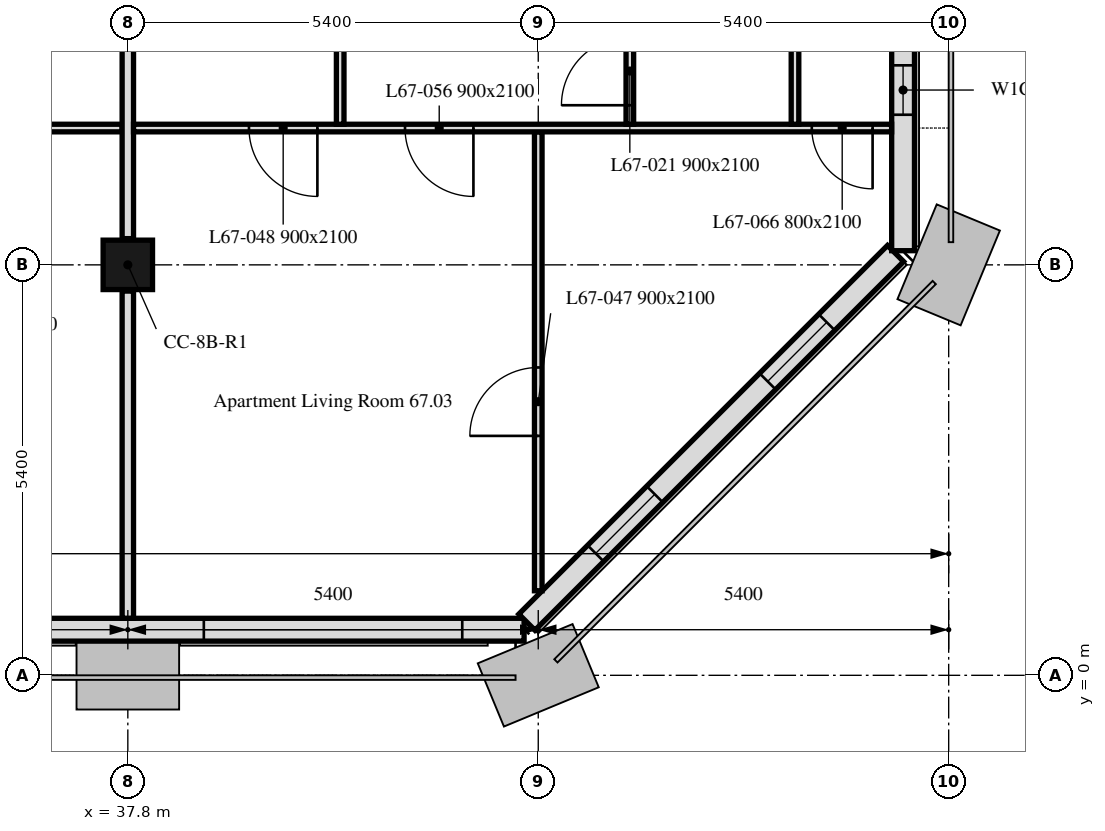
"""IFC4 building model, lengths in metres.
Left out: names, types, materials, properties, quantities, classifications, styles, units other than length and angle.
Written with IfcOpenShell. Run it as: python <this file> out.ifc"""

import sys

from ifc_helpers import new_model, si_unit, direction, frame, frame_2d, origin, origin_2d, place, context, subcontext, project, spatial, rectangle, extrude, element, fill, save


model = new_model("IFC4")
c1 = context("Model", 3, precision=1e-05, world=origin(), true_north=direction((0.0, 1.0)))
c2 = subcontext(c1, "Body", "Model", "MODEL_VIEW")
j1 = project(units=[si_unit("LENGTHUNIT", "METRE"), si_unit("PLANEANGLEUNIT", "RADIAN")], contexts=[c1])
p1 = place(None, origin())
s1 = spatial("IfcSite", under=j1, at=p1, CompositionType="ELEMENT")
p2 = place(p1, origin())
s2 = spatial("IfcBuilding", under=s1, at=p2, CompositionType="ELEMENT")
p3 = place(p2, frame((0.0, 0.0, 275.2)))
s3 = spatial("IfcBuildingStorey", under=s2, at=p3, CompositionType="ELEMENT", Elevation=275.2)
p4 = place(p3, frame((37.8, 5.4, 0.0), z_axis=(0.0, 0.0, 1.0), x_axis=(1.0, 0.0, 0.0)))
e1 = element("IfcColumn", 1, at=p4, inside=s3, PredefinedType="COLUMN", context=c2, shape_type="SweptSolid", body=[
    extrude(rectangle(XDim=0.65, YDim=0.65, at=origin_2d()), origin(), (0.0, 0.0, 1.0), 3.0),
])
p5 = place(p3, frame((10.986, 0.6, 0.0), z_axis=(0.0, 0.0, 1.0), x_axis=(1.0, 0.0, 0.0)))
e2 = element("IfcWall", 2, at=p5, inside=s3, PredefinedType="SOLIDWALL", context=c2, shape_type="SweptSolid", body=[
    extrude(rectangle(XDim=32.027, YDim=0.3, at=frame_2d((16.014, 0.0))), origin(), (0.0, 0.0, 1.0), 3.0),
])
p6 = place(p5, frame((2.764, 0.0, 0.9)))
e3 = element("IfcOpeningElement", 3, at=p6, cuts=e2, PredefinedType="OPENING", context=c2, shape_type="SweptSolid", body=[
    extrude(rectangle(XDim=1.1, YDim=1.7, at=frame_2d((0.55, 0.85))), frame((0.0, 0.16, 0.0), z_axis=(0.0, -1.0, 0.0), x_axis=(1.0, 0.0, 0.0)), (0.0, 0.0, 1.0), 0.32),
])
p7 = place(p5, frame((6.214, 0.0, 0.9)))
e4 = element("IfcOpeningElement", 4, at=p7, cuts=e2, PredefinedType="OPENING", context=c2, shape_type="SweptSolid", body=[
    extrude(rectangle(XDim=3.4, YDim=1.7, at=frame_2d((1.7, 0.85))), frame((0.0, 0.16, 0.0), z_axis=(0.0, -1.0, 0.0), x_axis=(1.0, 0.0, 0.0)), (0.0, 0.0, 1.0), 0.32),
])
p8 = place(p5, frame((13.564, 0.0, 0.9)))
e5 = element("IfcOpeningElement", 5, at=p8, cuts=e2, PredefinedType="OPENING", context=c2, shape_type="SweptSolid", body=[
    extrude(rectangle(XDim=1.1, YDim=1.7, at=frame_2d((0.55, 0.85))), frame((0.0, 0.16, 0.0), z_axis=(0.0, -1.0, 0.0), x_axis=(1.0, 0.0, 0.0)), (0.0, 0.0, 1.0), 0.32),
])
p9 = place(p5, frame((17.014, 0.0, 0.9)))
e6 = element("IfcOpeningElement", 6, at=p9, cuts=e2, PredefinedType="OPENING", context=c2, shape_type="SweptSolid", body=[
    extrude(rectangle(XDim=3.4, YDim=1.7, at=frame_2d((1.7, 0.85))), frame((0.0, 0.16, 0.0), z_axis=(0.0, -1.0, 0.0), x_axis=(1.0, 0.0, 0.0)), (0.0, 0.0, 1.0), 0.32),
])
p10 = place(p5, frame((24.364, 0.0, 0.9)))
e7 = element("IfcOpeningElement", 7, at=p10, cuts=e2, PredefinedType="OPENING", context=c2, shape_type="SweptSolid", body=[
    extrude(rectangle(XDim=1.1, YDim=1.7, at=frame_2d((0.55, 0.85))), frame((0.0, 0.16, 0.0), z_axis=(0.0, -1.0, 0.0), x_axis=(1.0, 0.0, 0.0)), (0.0, 0.0, 1.0), 0.32),
])
p11 = place(p5, frame((27.814, 0.0, 0.9)))
e8 = element("IfcOpeningElement", 8, at=p11, cuts=e2, PredefinedType="OPENING", context=c2, shape_type="SweptSolid", body=[
    extrude(rectangle(XDim=3.4, YDim=1.7, at=frame_2d((1.7, 0.85))), frame((0.0, 0.16, 0.0), z_axis=(0.0, -1.0, 0.0), x_axis=(1.0, 0.0, 0.0)), (0.0, 0.0, 1.0), 0.32),
])
p12 = place(p3, frame((43.051, 0.699, 0.0), z_axis=(0.0, 0.0, 1.0), x_axis=(0.707106781187, 0.707106781187, 0.0)))
e9 = element("IfcWall", 9, at=p12, inside=s3, PredefinedType="SOLIDWALL", context=c2, shape_type="SweptSolid", body=[
    extrude(rectangle(XDim=6.86, YDim=0.3, at=frame_2d((3.43, 0.0))), origin(), (0.0, 0.0, 1.0), 3.0),
])
p13 = place(p12, frame((1.28, 0.0, 0.9)))
e10 = element("IfcOpeningElement", 10, at=p13, cuts=e9, PredefinedType="OPENING", context=c2, shape_type="SweptSolid", body=[
    extrude(rectangle(XDim=1.1, YDim=1.7, at=frame_2d((0.55, 0.85))), frame((0.0, 0.16, 0.0), z_axis=(0.0, -1.0, 0.0), x_axis=(1.0, 0.0, 0.0)), (0.0, 0.0, 1.0), 0.32),
])
p14 = place(p12, frame((4.48, 0.0, 0.9)))
e11 = element("IfcOpeningElement", 11, at=p14, cuts=e9, PredefinedType="OPENING", context=c2, shape_type="SweptSolid", body=[
    extrude(rectangle(XDim=1.1, YDim=1.7, at=frame_2d((0.55, 0.85))), frame((0.0, 0.16, 0.0), z_axis=(0.0, -1.0, 0.0), x_axis=(1.0, 0.0, 0.0)), (0.0, 0.0, 1.0), 0.32),
])
p15 = place(p3, frame((48.0, 5.586, 0.0), z_axis=(0.0, 0.0, 1.0), x_axis=(0.0, 1.0, 0.0)))
e12 = element("IfcWall", 12, at=p15, inside=s3, PredefinedType="SOLIDWALL", context=c2, shape_type="SweptSolid", body=[
    extrude(rectangle(XDim=32.027, YDim=0.3, at=frame_2d((16.014, 0.0))), origin(), (0.0, 0.0, 1.0), 3.0),
])
p16 = place(p15, frame((1.789, 0.0, 0.9)))
e13 = element("IfcOpeningElement", 13, at=p16, cuts=e12, PredefinedType="OPENING", context=c2, shape_type="SweptSolid", body=[
    extrude(rectangle(XDim=0.65, YDim=1.7, at=frame_2d((0.325, 0.85))), frame((0.0, 0.16, 0.0), z_axis=(0.0, -1.0, 0.0), x_axis=(1.0, 0.0, 0.0)), (0.0, 0.0, 1.0), 0.32),
])
p17 = place(p15, frame((2.764, 0.0, 0.9)))
e14 = element("IfcOpeningElement", 14, at=p17, cuts=e12, PredefinedType="OPENING", context=c2, shape_type="SweptSolid", body=[
    extrude(rectangle(XDim=1.1, YDim=1.7, at=frame_2d((0.55, 0.85))), frame((0.0, 0.16, 0.0), z_axis=(0.0, -1.0, 0.0), x_axis=(1.0, 0.0, 0.0)), (0.0, 0.0, 1.0), 0.32),
])
p18 = place(p15, frame((6.564, 0.0, 0.9)))
e15 = element("IfcOpeningElement", 15, at=p18, cuts=e12, PredefinedType="OPENING", context=c2, shape_type="SweptSolid", body=[
    extrude(rectangle(XDim=1.1, YDim=1.7, at=frame_2d((0.55, 0.85))), frame((0.0, 0.16, 0.0), z_axis=(0.0, -1.0, 0.0), x_axis=(1.0, 0.0, 0.0)), (0.0, 0.0, 1.0), 0.32),
])
p19 = place(p15, frame((7.989, 0.0, 0.9)))
e16 = element("IfcOpeningElement", 16, at=p19, cuts=e12, PredefinedType="OPENING", context=c2, shape_type="SweptSolid", body=[
    extrude(rectangle(XDim=0.65, YDim=1.7, at=frame_2d((0.325, 0.85))), frame((0.0, 0.16, 0.0), z_axis=(0.0, -1.0, 0.0), x_axis=(1.0, 0.0, 0.0)), (0.0, 0.0, 1.0), 0.32),
])
p20 = place(p15, frame((11.964, 0.0, 0.9)))
e17 = element("IfcOpeningElement", 17, at=p20, cuts=e12, PredefinedType="OPENING", context=c2, shape_type="SweptSolid", body=[
    extrude(rectangle(XDim=1.1, YDim=1.7, at=frame_2d((0.55, 0.85))), frame((0.0, 0.16, 0.0), z_axis=(0.0, -1.0, 0.0), x_axis=(1.0, 0.0, 0.0)), (0.0, 0.0, 1.0), 0.32),
])
p21 = place(p15, frame((13.564, 0.0, 0.9)))
e18 = element("IfcOpeningElement", 18, at=p21, cuts=e12, PredefinedType="OPENING", context=c2, shape_type="SweptSolid", body=[
    extrude(rectangle(XDim=1.1, YDim=1.7, at=frame_2d((0.55, 0.85))), frame((0.0, 0.16, 0.0), z_axis=(0.0, -1.0, 0.0), x_axis=(1.0, 0.0, 0.0)), (0.0, 0.0, 1.0), 0.32),
])
p22 = place(p15, frame((17.014, 0.0, 0.9)))
e19 = element("IfcOpeningElement", 19, at=p22, cuts=e12, PredefinedType="OPENING", context=c2, shape_type="SweptSolid", body=[
    extrude(rectangle(XDim=3.4, YDim=1.7, at=frame_2d((1.7, 0.85))), frame((0.0, 0.16, 0.0), z_axis=(0.0, -1.0, 0.0), x_axis=(1.0, 0.0, 0.0)), (0.0, 0.0, 1.0), 0.32),
])
p23 = place(p15, frame((22.764, 0.0, 0.9)))
e20 = element("IfcOpeningElement", 20, at=p23, cuts=e12, PredefinedType="OPENING", context=c2, shape_type="SweptSolid", body=[
    extrude(rectangle(XDim=1.1, YDim=1.7, at=frame_2d((0.55, 0.85))), frame((0.0, 0.16, 0.0), z_axis=(0.0, -1.0, 0.0), x_axis=(1.0, 0.0, 0.0)), (0.0, 0.0, 1.0), 0.32),
])
p24 = place(p15, frame((24.364, 0.0, 0.9)))
e21 = element("IfcOpeningElement", 21, at=p24, cuts=e12, PredefinedType="OPENING", context=c2, shape_type="SweptSolid", body=[
    extrude(rectangle(XDim=1.1, YDim=1.7, at=frame_2d((0.55, 0.85))), frame((0.0, 0.16, 0.0), z_axis=(0.0, -1.0, 0.0), x_axis=(1.0, 0.0, 0.0)), (0.0, 0.0, 1.0), 0.32),
])
p25 = place(p15, frame((28.789, 0.0, 0.9)))
e22 = element("IfcOpeningElement", 22, at=p25, cuts=e12, PredefinedType="OPENING", context=c2, shape_type="SweptSolid", body=[
    extrude(rectangle(XDim=0.65, YDim=1.7, at=frame_2d((0.325, 0.85))), frame((0.0, 0.16, 0.0), z_axis=(0.0, -1.0, 0.0), x_axis=(1.0, 0.0, 0.0)), (0.0, 0.0, 1.0), 0.32),
])
p26 = place(p15, frame((29.764, 0.0, 0.9)))
e23 = element("IfcOpeningElement", 23, at=p26, cuts=e12, PredefinedType="OPENING", context=c2, shape_type="SweptSolid", body=[
    extrude(rectangle(XDim=1.1, YDim=1.7, at=frame_2d((0.55, 0.85))), frame((0.0, 0.16, 0.0), z_axis=(0.0, -1.0, 0.0), x_axis=(1.0, 0.0, 0.0)), (0.0, 0.0, 1.0), 0.32),
])
p27 = place(p3, frame((37.8, 0.751, 0.0), z_axis=(0.0, 0.0, 1.0), x_axis=(0.0, 1.0, 0.0)))
e24 = element("IfcWall", 24, at=p27, inside=s3, PredefinedType="PARTITIONING", context=c2, shape_type="SweptSolid", body=[
    extrude(rectangle(XDim=4.304, YDim=0.15, at=frame_2d((2.152, 0.0))), origin(), (0.0, 0.0, 1.0), 2.4),
])
p28 = place(p3, frame((37.725, 7.2, 0.0), z_axis=(0.0, 0.0, 1.0), x_axis=(-1.0, 0.0, 0.0)))
e25 = element("IfcWall", 25, at=p28, inside=s3, PredefinedType="PARTITIONING", context=c2, shape_type="SweptSolid", body=[
    extrude(rectangle(XDim=5.25, YDim=0.1, at=frame_2d((2.625, 0.0))), origin(), (0.0, 0.0, 1.0), 3.0),
])
p29 = place(p28, frame((2.89, 0.0, 0.0)))
e26 = element("IfcOpeningElement", 26, at=p29, cuts=e25, PredefinedType="OPENING", context=c2, shape_type="SweptSolid", body=[
    extrude(rectangle(XDim=0.9, YDim=2.1, at=frame_2d((0.45, 1.05))), frame((0.0, 0.05, 0.0), z_axis=(0.0, -1.0, 0.0), x_axis=(1.0, 0.0, 0.0)), (0.0, 0.0, 1.0), 0.1),
])
p30 = place(p28, frame((1.39, 0.0, 0.0)))
e27 = element("IfcOpeningElement", 27, at=p30, cuts=e25, PredefinedType="OPENING", context=c2, shape_type="SweptSolid", body=[
    extrude(rectangle(XDim=0.9, YDim=2.1, at=frame_2d((0.45, 1.05))), frame((0.0, 0.05, 0.0), z_axis=(0.0, -1.0, 0.0), x_axis=(1.0, 0.0, 0.0)), (0.0, 0.0, 1.0), 0.1),
])
p31 = place(p3, frame((37.8, 5.745, 0.0), z_axis=(0.0, 0.0, 1.0), x_axis=(0.0, 1.0, 0.0)))
e28 = element("IfcWall", 28, at=p31, inside=s3, PredefinedType="PARTITIONING", context=c2, shape_type="SweptSolid", body=[
    extrude(rectangle(XDim=4.71, YDim=0.15, at=frame_2d((2.355, 0.0))), origin(), (0.0, 0.0, 1.0), 2.4),
])
p32 = place(p3, frame((43.2, 1.112, 0.0), z_axis=(0.0, 0.0, 1.0), x_axis=(0.0, 1.0, 0.0)))
e29 = element("IfcWall", 29, at=p32, inside=s3, PredefinedType="PARTITIONING", context=c2, shape_type="SweptSolid", body=[
    extrude(rectangle(XDim=6.038, YDim=0.1, at=frame_2d((3.019, 0.0))), origin(), (0.0, 0.0, 1.0), 3.0),
])
p33 = place(p32, frame((2.038, 0.0, 0.0)))
e30 = element("IfcOpeningElement", 30, at=p33, cuts=e29, PredefinedType="OPENING", context=c2, shape_type="SweptSolid", body=[
    extrude(rectangle(XDim=0.9, YDim=2.1, at=frame_2d((0.45, 1.05))), frame((0.0, 0.05, 0.0), z_axis=(0.0, -1.0, 0.0), x_axis=(1.0, 0.0, 0.0)), (0.0, 0.0, 1.0), 0.1),
])
p34 = place(p3, frame((47.849, 7.2, 0.0), z_axis=(0.0, 0.0, 1.0), x_axis=(-1.0, 0.0, 0.0)))
e31 = element("IfcWall", 31, at=p34, inside=s3, PredefinedType="PARTITIONING", context=c2, shape_type="SweptSolid", body=[
    extrude(rectangle(XDim=9.974, YDim=0.1, at=frame_2d((4.987, 0.0))), origin(), (0.0, 0.0, 1.0), 3.0),
])
p35 = place(p34, frame((7.555, 0.0, 0.0)))
e32 = element("IfcOpeningElement", 32, at=p35, cuts=e31, PredefinedType="OPENING", context=c2, shape_type="SweptSolid", body=[
    extrude(rectangle(XDim=0.9, YDim=2.1, at=frame_2d((0.45, 1.05))), frame((0.0, 0.05, 0.0), z_axis=(0.0, -1.0, 0.0), x_axis=(1.0, 0.0, 0.0)), (0.0, 0.0, 1.0), 0.1),
])
p36 = place(p34, frame((5.502, 0.0, 0.0)))
e33 = element("IfcOpeningElement", 33, at=p36, cuts=e31, PredefinedType="OPENING", context=c2, shape_type="SweptSolid", body=[
    extrude(rectangle(XDim=0.9, YDim=2.1, at=frame_2d((0.45, 1.05))), frame((0.0, 0.05, 0.0), z_axis=(0.0, -1.0, 0.0), x_axis=(1.0, 0.0, 0.0)), (0.0, 0.0, 1.0), 0.1),
])
p37 = place(p34, frame((0.25, 0.0, 0.0)))
e34 = element("IfcOpeningElement", 34, at=p37, cuts=e31, PredefinedType="OPENING", context=c2, shape_type="SweptSolid", body=[
    extrude(rectangle(XDim=0.8, YDim=2.1, at=frame_2d((0.4, 1.05))), frame((0.0, 0.05, 0.0), z_axis=(0.0, -1.0, 0.0), x_axis=(1.0, 0.0, 0.0)), (0.0, 0.0, 1.0), 0.1),
])
p38 = place(p3, frame((40.594, 7.25, 0.0), z_axis=(0.0, 0.0, 1.0), x_axis=(0.0, 1.0, 0.0)))
e35 = element("IfcWall", 35, at=p38, inside=s3, PredefinedType="PARTITIONING", context=c2, shape_type="SweptSolid", body=[
    extrude(rectangle(XDim=7.075, YDim=0.1, at=frame_2d((3.538, 0.0))), origin(), (0.0, 0.0, 1.0), 2.4),
])
p39 = place(p38, frame((5.2, 0.0, 0.0)))
e36 = element("IfcOpeningElement", 36, at=p39, cuts=e35, PredefinedType="OPENING", context=c2, shape_type="SweptSolid", body=[
    extrude(rectangle(XDim=0.9, YDim=2.1, at=frame_2d((0.45, 1.05))), frame((0.0, 0.05, 0.0), z_axis=(0.0, -1.0, 0.0), x_axis=(1.0, 0.0, 0.0)), (0.0, 0.0, 1.0), 0.1),
])
p40 = place(p38, frame((1.6, 0.0, 0.0)))
e37 = element("IfcOpeningElement", 37, at=p40, cuts=e35, PredefinedType="OPENING", context=c2, shape_type="SweptSolid", body=[
    extrude(rectangle(XDim=0.9, YDim=2.1, at=frame_2d((0.45, 1.05))), frame((0.0, 0.05, 0.0), z_axis=(0.0, -1.0, 0.0), x_axis=(1.0, 0.0, 0.0)), (0.0, 0.0, 1.0), 0.1),
])
p41 = place(p3, frame((44.405, 7.25, 0.0), z_axis=(0.0, 0.0, 1.0), x_axis=(0.0, 1.0, 0.0)))
e38 = element("IfcWall", 38, at=p41, inside=s3, PredefinedType="PARTITIONING", context=c2, shape_type="SweptSolid", body=[
    extrude(rectangle(XDim=7.075, YDim=0.1, at=frame_2d((3.538, 0.0))), origin(), (0.0, 0.0, 1.0), 2.4),
])
p42 = place(p41, frame((0.25, 0.0, 0.0)))
e39 = element("IfcOpeningElement", 39, at=p42, cuts=e38, PredefinedType="OPENING", context=c2, shape_type="SweptSolid", body=[
    extrude(rectangle(XDim=0.9, YDim=2.1, at=frame_2d((0.45, 1.05))), frame((0.0, 0.05, 0.0), z_axis=(0.0, -1.0, 0.0), x_axis=(1.0, 0.0, 0.0)), (0.0, 0.0, 1.0), 0.1),
])
p43 = place(p41, frame((5.925, 0.0, 0.0)))
e40 = element("IfcOpeningElement", 40, at=p43, cuts=e38, PredefinedType="OPENING", context=c2, shape_type="SweptSolid", body=[
    extrude(rectangle(XDim=0.9, YDim=2.1, at=frame_2d((0.45, 1.05))), frame((0.0, 0.05, 0.0), z_axis=(0.0, -1.0, 0.0), x_axis=(1.0, 0.0, 0.0)), (0.0, 0.0, 1.0), 0.1),
])
p44 = place(p3, frame((46.578, 7.25, 0.0), z_axis=(0.0, 0.0, 1.0), x_axis=(0.0, 1.0, 0.0)))
e41 = element("IfcWall", 41, at=p44, inside=s3, PredefinedType="PARTITIONING", context=c2, shape_type="SweptSolid", body=[
    extrude(rectangle(XDim=7.075, YDim=0.1, at=frame_2d((3.538, 0.0))), origin(), (0.0, 0.0, 1.0), 2.4),
])
p45 = place(p44, frame((5.2, 0.0, 0.0)))
e42 = element("IfcOpeningElement", 42, at=p45, cuts=e41, PredefinedType="OPENING", context=c2, shape_type="SweptSolid", body=[
    extrude(rectangle(XDim=0.9, YDim=2.1, at=frame_2d((0.45, 1.05))), frame((0.0, 0.05, 0.0), z_axis=(0.0, -1.0, 0.0), x_axis=(1.0, 0.0, 0.0)), (0.0, 0.0, 1.0), 0.1),
])
p46 = place(p11, origin())
e43 = element("IfcWindow", 43, at=p46, inside=s3, PartitioningType="SINGLE_PANEL", PredefinedType="WINDOW", context=c2, shape_type="SweptSolid", body=[
    extrude(rectangle(XDim=3.4, YDim=1.7, at=frame_2d((1.7, 0.85))), frame((0.0, 0.03, 0.0), z_axis=(0.0, -1.0, 0.0), x_axis=(1.0, 0.0, 0.0)), (0.0, 0.0, 1.0), 0.06),
])
fill(e8, e43)
p47 = place(p13, origin())
e44 = element("IfcWindow", 44, at=p47, inside=s3, PartitioningType="SINGLE_PANEL", PredefinedType="WINDOW", context=c2, shape_type="SweptSolid", body=[
    extrude(rectangle(XDim=1.1, YDim=1.7, at=frame_2d((0.55, 0.85))), frame((0.0, 0.03, 0.0), z_axis=(0.0, -1.0, 0.0), x_axis=(1.0, 0.0, 0.0)), (0.0, 0.0, 1.0), 0.06),
])
fill(e10, e44)
p48 = place(p14, origin())
e45 = element("IfcWindow", 45, at=p48, inside=s3, PartitioningType="SINGLE_PANEL", PredefinedType="WINDOW", context=c2, shape_type="SweptSolid", body=[
    extrude(rectangle(XDim=1.1, YDim=1.7, at=frame_2d((0.55, 0.85))), frame((0.0, 0.03, 0.0), z_axis=(0.0, -1.0, 0.0), x_axis=(1.0, 0.0, 0.0)), (0.0, 0.0, 1.0), 0.06),
])
fill(e11, e45)
p49 = place(p16, origin())
e46 = element("IfcWindow", 46, at=p49, inside=s3, PartitioningType="SINGLE_PANEL", PredefinedType="WINDOW", context=c2, shape_type="SweptSolid", body=[
    extrude(rectangle(XDim=0.65, YDim=1.7, at=frame_2d((0.325, 0.85))), frame((0.0, 0.03, 0.0), z_axis=(0.0, -1.0, 0.0), x_axis=(1.0, 0.0, 0.0)), (0.0, 0.0, 1.0), 0.06),
])
fill(e13, e46)
p50 = place(p42, origin())
e47 = element("IfcDoor", 47, at=p50, inside=s3, OperationType="SINGLE_SWING_RIGHT", PredefinedType="DOOR", context=c2, shape_type="SweptSolid", body=[
    extrude(rectangle(XDim=0.9, YDim=2.1, at=frame_2d((0.45, 1.05))), frame((0.0, 0.025, 0.0), z_axis=(0.0, -1.0, 0.0), x_axis=(1.0, 0.0, 0.0)), (0.0, 0.0, 1.0), 0.05),
])
fill(e39, e47)
p51 = place(p33, origin())
e48 = element("IfcDoor", 48, at=p51, inside=s3, OperationType="SINGLE_SWING_LEFT", PredefinedType="DOOR", context=c2, shape_type="SweptSolid", body=[
    extrude(rectangle(XDim=0.9, YDim=2.1, at=frame_2d((0.45, 1.05))), frame((0.0, 0.025, 0.0), z_axis=(0.0, -1.0, 0.0), x_axis=(1.0, 0.0, 0.0)), (0.0, 0.0, 1.0), 0.05),
])
fill(e30, e48)
p52 = place(p35, origin())
e49 = element("IfcDoor", 49, at=p52, inside=s3, OperationType="SINGLE_SWING_RIGHT", PredefinedType="DOOR", context=c2, shape_type="SweptSolid", body=[
    extrude(rectangle(XDim=0.9, YDim=2.1, at=frame_2d((0.45, 1.05))), frame((0.0, 0.025, 0.0), z_axis=(0.0, -1.0, 0.0), x_axis=(1.0, 0.0, 0.0)), (0.0, 0.0, 1.0), 0.05),
])
fill(e32, e49)
p53 = place(p36, origin())
e50 = element("IfcDoor", 50, at=p53, inside=s3, OperationType="SINGLE_SWING_LEFT", PredefinedType="DOOR", context=c2, shape_type="SweptSolid", body=[
    extrude(rectangle(XDim=0.9, YDim=2.1, at=frame_2d((0.45, 1.05))), frame((0.0, 0.025, 0.0), z_axis=(0.0, -1.0, 0.0), x_axis=(1.0, 0.0, 0.0)), (0.0, 0.0, 1.0), 0.05),
])
fill(e33, e50)
p54 = place(p37, origin())
e51 = element("IfcDoor", 51, at=p54, inside=s3, OperationType="SINGLE_SWING_LEFT", PredefinedType="DOOR", context=c2, shape_type="SweptSolid", body=[
    extrude(rectangle(XDim=0.8, YDim=2.1, at=frame_2d((0.4, 1.05))), frame((0.0, 0.025, 0.0), z_axis=(0.0, -1.0, 0.0), x_axis=(1.0, 0.0, 0.0)), (0.0, 0.0, 1.0), 0.05),
])
fill(e34, e51)
save(model, sys.argv[1])
